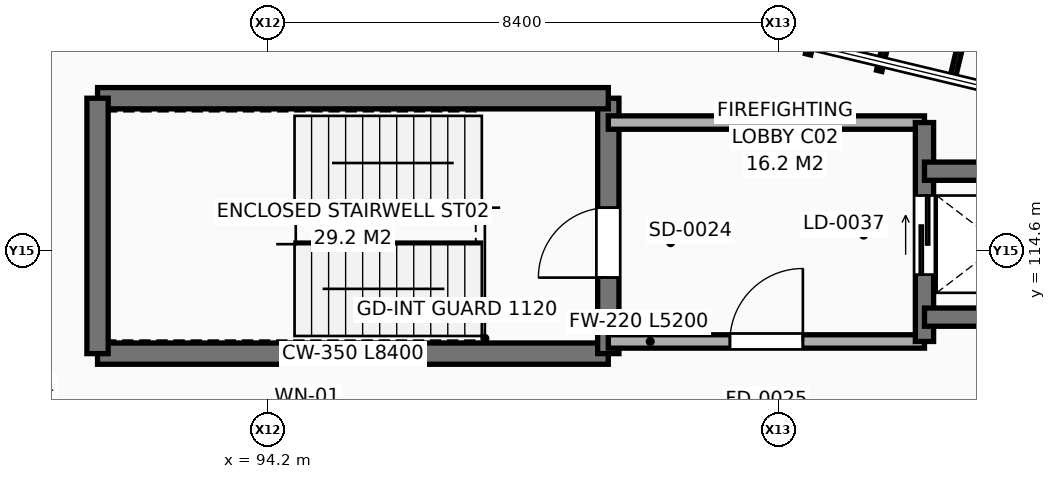
"""IFC4 building model, lengths in metres.
Left out: names, types, materials, properties, quantities, classifications, styles, units other than length and angle.
Written with IfcOpenShell. Run it as: python <this file> out.ifc"""

import sys

from ifc_helpers import new_model, si_unit, direction, frame, frame_2d, origin, place, context, subcontext, project, spatial, rectangle, extrude, element, fill, save


model = new_model("IFC4")
c1 = context("Model", 3, precision=1e-05, world=origin(), true_north=direction((0.0, 1.0)))
c2 = subcontext(c1, "Body", "Model", "MODEL_VIEW")
j1 = project(units=[si_unit("LENGTHUNIT", "METRE"), si_unit("PLANEANGLEUNIT", "RADIAN")], contexts=[c1])
p1 = place(None, origin())
s1 = spatial("IfcSite", under=j1, at=p1, CompositionType="ELEMENT")
p2 = place(p1, origin())
s2 = spatial("IfcBuilding", under=s1, at=p2, CompositionType="ELEMENT")
p3 = place(p2, frame((0.0, 0.0, 5.4)))
s3 = spatial("IfcBuildingStorey", under=s2, at=p3, CompositionType="ELEMENT", Elevation=5.4)
p4 = place(p3, frame((98.912, 111.5, 0.0), z_axis=(0.0, 0.0, 1.0), x_axis=(-0.999198380478, 0.040032442472, 0.0)))
e1 = element("IfcWall", 1, at=p4, inside=s3, PredefinedType="SOLIDWALL", context=c2, shape_type="SweptSolid", body=[
    extrude(rectangle(XDim=12.868, YDim=0.34, at=frame_2d((6.434, 0.0))), origin(), (0.0, 0.0, 1.0), 3.387),
])
p5 = place(p4, frame((3.489, 0.0, 0.9)))
e2 = element("IfcOpeningElement", 2, at=p5, cuts=e1, PredefinedType="OPENING", context=c2, shape_type="SweptSolid", body=[
    extrude(rectangle(XDim=1.2, YDim=2.1, at=frame_2d((0.6, 1.05))), frame((0.0, 0.18, 0.0), z_axis=(0.0, -1.0, 0.0), x_axis=(1.0, 0.0, 0.0)), (0.0, 0.0, 1.0), 0.36),
])
p6 = place(p4, frame((8.179, 0.0, 0.9)))
e3 = element("IfcOpeningElement", 3, at=p6, cuts=e1, PredefinedType="OPENING", context=c2, shape_type="SweptSolid", body=[
    extrude(rectangle(XDim=1.2, YDim=2.1, at=frame_2d((0.6, 1.05))), frame((0.0, 0.18, 0.0), z_axis=(0.0, -1.0, 0.0), x_axis=(1.0, 0.0, 0.0)), (0.0, 0.0, 1.0), 0.36),
])
p7 = place(p3, frame((91.4, 112.9, 0.0), z_axis=(0.0, 0.0, 1.0), x_axis=(1.0, 0.0, 0.0)))
e4 = element("IfcWall", 4, at=p7, inside=s3, PredefinedType="SHEAR", context=c2, shape_type="SweptSolid", body=[
    extrude(rectangle(XDim=8.4, YDim=0.35, at=frame_2d((4.2, 0.0))), origin(), (0.0, 0.0, 1.0), 3.92),
])
p8 = place(p3, frame((99.8, 112.9, 0.0), z_axis=(0.0, 0.0, 1.0), x_axis=(0.0, 1.0, 0.0)))
e5 = element("IfcWall", 5, at=p8, inside=s3, PredefinedType="SHEAR", context=c2, shape_type="SweptSolid", body=[
    extrude(rectangle(XDim=4.2, YDim=0.35, at=frame_2d((2.1, 0.0))), origin(), (0.0, 0.0, 1.0), 3.92),
])
p9 = place(p8, frame((1.25, 0.0, 0.0)))
e6 = element("IfcOpeningElement", 6, at=p9, cuts=e5, PredefinedType="OPENING", context=c2, shape_type="SweptSolid", body=[
    extrude(rectangle(XDim=1.15, YDim=2.2, at=frame_2d((0.575, 1.1))), frame((0.0, 0.185, 0.0), z_axis=(0.0, -1.0, 0.0), x_axis=(1.0, 0.0, 0.0)), (0.0, 0.0, 1.0), 0.37),
])
p10 = place(p3, frame((99.8, 117.1, 0.0), z_axis=(0.0, 0.0, 1.0), x_axis=(-1.0, 0.0, 0.0)))
e7 = element("IfcWall", 7, at=p10, inside=s3, PredefinedType="SHEAR", context=c2, shape_type="SweptSolid", body=[
    extrude(rectangle(XDim=8.4, YDim=0.35, at=frame_2d((4.2, 0.0))), origin(), (0.0, 0.0, 1.0), 3.92),
])
p11 = place(p3, frame((91.4, 117.1, 0.0), z_axis=(0.0, 0.0, 1.0), x_axis=(0.0, -1.0, 0.0)))
e8 = element("IfcWall", 8, at=p11, inside=s3, PredefinedType="SHEAR", context=c2, shape_type="SweptSolid", body=[
    extrude(rectangle(XDim=4.2, YDim=0.35, at=frame_2d((2.1, 0.0))), origin(), (0.0, 0.0, 1.0), 3.92),
])
p12 = place(p3, frame((99.8, 113.1, 0.0), z_axis=(0.0, 0.0, 1.0), x_axis=(1.0, 0.0, 0.0)))
e9 = element("IfcWall", 9, at=p12, inside=s3, PredefinedType="SOLIDWALL", context=c2, shape_type="SweptSolid", body=[
    extrude(rectangle(XDim=5.2, YDim=0.22, at=frame_2d((2.6, 0.0))), origin(), (0.0, 0.0, 1.0), 3.92),
])
p13 = place(p12, frame((2.0, 0.0, 0.0)))
e10 = element("IfcOpeningElement", 10, at=p13, cuts=e9, PredefinedType="OPENING", context=c2, shape_type="SweptSolid", body=[
    extrude(rectangle(XDim=1.2, YDim=2.2, at=frame_2d((0.6, 1.1))), frame((0.0, 0.12, 0.0), z_axis=(0.0, -1.0, 0.0), x_axis=(1.0, 0.0, 0.0)), (0.0, 0.0, 1.0), 0.24),
])
p14 = place(p3, frame((105.0, 116.7, 0.0), z_axis=(0.0, 0.0, 1.0), x_axis=(-1.0, 0.0, 0.0)))
e11 = element("IfcWall", 11, at=p14, inside=s3, PredefinedType="SOLIDWALL", context=c2, shape_type="SweptSolid", body=[
    extrude(rectangle(XDim=5.2, YDim=0.22, at=frame_2d((2.6, 0.0))), origin(), (0.0, 0.0, 1.0), 3.92),
])
p15 = place(p3, frame((105.0, 113.1, 0.0), z_axis=(0.0, 0.0, 1.0), x_axis=(0.0, 1.0, 0.0)))
e12 = element("IfcWall", 12, at=p15, inside=s3, PredefinedType="SHEAR", context=c2, shape_type="SweptSolid", body=[
    extrude(rectangle(XDim=3.6, YDim=0.3, at=frame_2d((1.8, 0.0))), origin(), (0.0, 0.0, 1.0), 3.92),
])
p16 = place(p15, frame((1.1, 0.0, 0.0)))
e13 = element("IfcOpeningElement", 13, at=p16, cuts=e12, PredefinedType="OPENING", context=c2, shape_type="SweptSolid", body=[
    extrude(rectangle(XDim=1.3, YDim=2.3, at=frame_2d((0.65, 1.15))), frame((0.0, 0.16, 0.0), z_axis=(0.0, -1.0, 0.0), x_axis=(1.0, 0.0, 0.0)), (0.0, 0.0, 1.0), 0.32),
])
for number, where, z_axis, x_axis in (
    (14, (107.5, 115.9, 0.0), (0.0, 0.0, 1.0), (-1.0, 0.0, 0.0)),
    (15, (105.0, 113.5, 0.0), (0.0, 0.0, 1.0), (1.0, 0.0, 0.0)),
):
    element("IfcWall", number, at=place(p3, frame(where, z_axis=z_axis, x_axis=x_axis)), inside=s3, PredefinedType="SHEAR", context=c2, shape_type="SweptSolid", body=[
        extrude(rectangle(XDim=2.5, YDim=0.3, at=frame_2d((1.25, 0.0))), origin(), (0.0, 0.0, 1.0), 3.92),
    ])
p17 = place(p9, origin())
e16 = element("IfcDoor", 16, at=p17, inside=s3, OperationType="SINGLE_SWING_LEFT", PredefinedType="DOOR", context=c2, shape_type="SweptSolid", body=[
    extrude(rectangle(XDim=1.15, YDim=2.2, at=frame_2d((0.575, 1.1))), frame((0.0, 0.025, 0.0), z_axis=(0.0, -1.0, 0.0), x_axis=(1.0, 0.0, 0.0)), (0.0, 0.0, 1.0), 0.05),
])
fill(e6, e16)
p18 = place(p13, origin())
e17 = element("IfcDoor", 17, at=p18, inside=s3, OperationType="SINGLE_SWING_RIGHT", PredefinedType="DOOR", context=c2, shape_type="SweptSolid", body=[
    extrude(rectangle(XDim=1.2, YDim=2.2, at=frame_2d((0.6, 1.1))), frame((0.0, 0.025, 0.0), z_axis=(0.0, -1.0, 0.0), x_axis=(1.0, 0.0, 0.0)), (0.0, 0.0, 1.0), 0.05),
])
fill(e10, e17)
p19 = place(p16, origin())
e18 = element("IfcDoor", 18, at=p19, inside=s3, OperationType="SLIDING_TO_LEFT", PredefinedType="DOOR", context=c2, shape_type="SweptSolid", body=[
    extrude(rectangle(XDim=1.3, YDim=2.3, at=frame_2d((0.65, 1.15))), frame((0.0, 0.025, 0.0), z_axis=(0.0, -1.0, 0.0), x_axis=(1.0, 0.0, 0.0)), (0.0, 0.0, 1.0), 0.05),
])
fill(e13, e18)
save(model, sys.argv[1])
